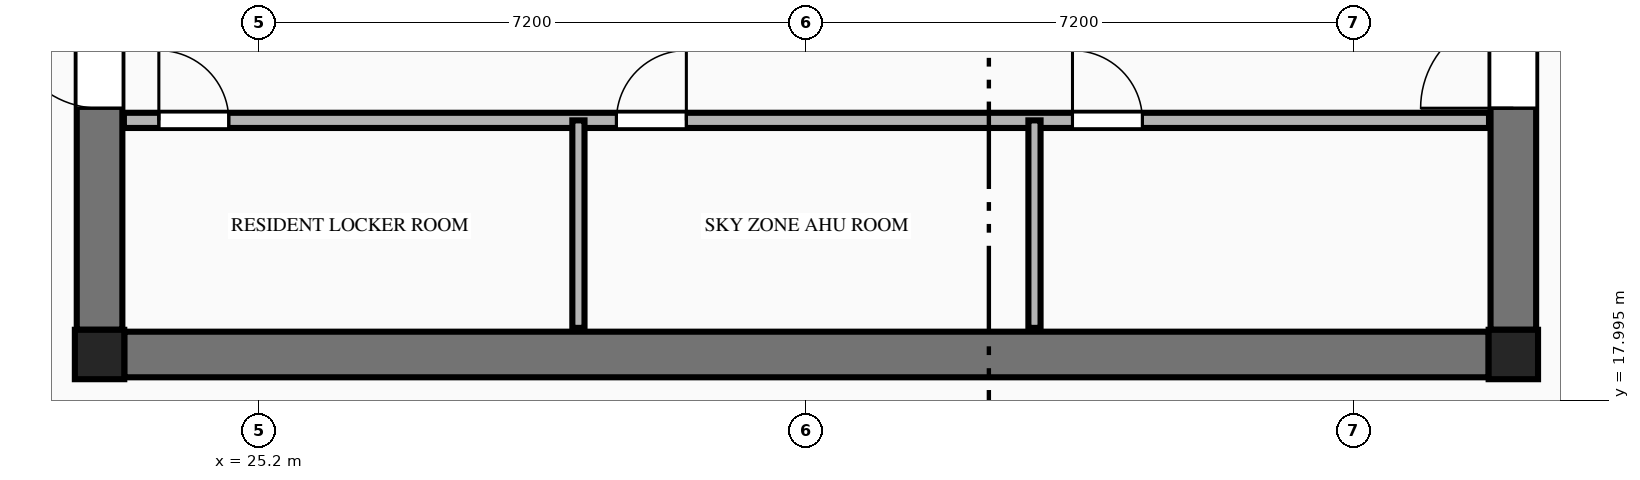
"""IFC4 building model, lengths in metres.
Left out: names, types, materials, properties, quantities, classifications, styles, units other than length and angle.
Written with IfcOpenShell. Run it as: python <this file> out.ifc"""

import sys

from ifc_helpers import new_model, si_unit, direction, frame, frame_2d, origin, origin_2d, place, context, subcontext, project, spatial, rectangle, extrude, element, fill, save


model = new_model("IFC4")
c1 = context("Model", 3, precision=1e-05, world=origin(), true_north=direction((0.0, 1.0)))
c2 = subcontext(c1, "Body", "Model", "MODEL_VIEW")
j1 = project(units=[si_unit("LENGTHUNIT", "METRE"), si_unit("PLANEANGLEUNIT", "RADIAN")], contexts=[c1])
p1 = place(None, origin())
s1 = spatial("IfcSite", under=j1, at=p1, CompositionType="ELEMENT")
p2 = place(p1, origin())
s2 = spatial("IfcBuilding", under=s1, at=p2, CompositionType="ELEMENT")
p3 = place(p2, frame((0.0, 0.0, 182.55)))
s3 = spatial("IfcBuildingStorey", under=s2, at=p3, CompositionType="ELEMENT", Elevation=182.55)
for number, where, z_axis, x_axis in (
    (1, (23.1, 18.6, 0.0), (0.0, 0.0, 1.0), (1.0, 0.0, 0.0)),
    (2, (41.7, 18.6, 0.0), (0.0, 0.0, 1.0), (1.0, 0.0, 0.0)),
):
    element("IfcColumn", number, at=place(p3, frame(where, z_axis=z_axis, x_axis=x_axis)), inside=s3, PredefinedType="COLUMN", context=c2, shape_type="SweptSolid", body=[
        extrude(rectangle(XDim=0.65, YDim=0.65, at=origin_2d()), origin(), (0.0, 0.0, 1.0), 3.55),
    ])
p4 = place(p3, frame((23.425, 18.6, 0.0), z_axis=(0.0, 0.0, 1.0), x_axis=(1.0, 0.0, 0.0)))
e3 = element("IfcWall", 3, at=p4, inside=s3, PredefinedType="SHEAR", context=c2, shape_type="SweptSolid", body=[
    extrude(rectangle(XDim=17.95, YDim=0.6, at=frame_2d((8.975, 0.0))), origin(), (0.0, 0.0, 1.0), 3.35),
])
p5 = place(p3, frame((23.1, 18.925, 0.0), z_axis=(0.0, 0.0, 1.0), x_axis=(0.0, 1.0, 0.0)))
e4 = element("IfcWall", 4, at=p5, inside=s3, PredefinedType="SHEAR", context=c2, shape_type="SweptSolid", body=[
    extrude(rectangle(XDim=13.95, YDim=0.6, at=frame_2d((6.975, 0.0))), origin(), (0.0, 0.0, 1.0), 3.35),
])
p6 = place(p5, frame((2.915, 0.0, 0.0)))
e5 = element("IfcOpeningElement", 5, at=p6, cuts=e4, PredefinedType="OPENING", context=c2, shape_type="SweptSolid", body=[
    extrude(rectangle(XDim=1.22, YDim=2.25, at=frame_2d((0.61, 1.125))), frame((0.0, 0.31, 0.0), z_axis=(0.0, -1.0, 0.0), x_axis=(1.0, 0.0, 0.0)), (0.0, 0.0, 1.0), 0.62),
])
p7 = place(p3, frame((41.7, 18.925, 0.0), z_axis=(0.0, 0.0, 1.0), x_axis=(0.0, 1.0, 0.0)))
e6 = element("IfcWall", 6, at=p7, inside=s3, PredefinedType="SHEAR", context=c2, shape_type="SweptSolid", body=[
    extrude(rectangle(XDim=13.95, YDim=0.6, at=frame_2d((6.975, 0.0))), origin(), (0.0, 0.0, 1.0), 3.35),
])
p8 = place(p7, frame((2.915, 0.0, 0.0)))
e7 = element("IfcOpeningElement", 7, at=p8, cuts=e6, PredefinedType="OPENING", context=c2, shape_type="SweptSolid", body=[
    extrude(rectangle(XDim=1.22, YDim=2.25, at=frame_2d((0.61, 1.125))), frame((0.0, 0.31, 0.0), z_axis=(0.0, -1.0, 0.0), x_axis=(1.0, 0.0, 0.0)), (0.0, 0.0, 1.0), 0.62),
])
p9 = place(p3, frame((23.42, 21.68, 0.0), z_axis=(0.0, 0.0, 1.0), x_axis=(1.0, 0.0, 0.0)))
e8 = element("IfcWall", 8, at=p9, inside=s3, PredefinedType="PLUMBINGWALL", context=c2, shape_type="SweptSolid", body=[
    extrude(rectangle(XDim=17.96, YDim=0.2, at=frame_2d((8.98, 0.0))), origin(), (0.0, 0.0, 1.0), 3.35),
])
p10 = place(p9, frame((0.46, 0.0, 0.0)))
e9 = element("IfcOpeningElement", 9, at=p10, cuts=e8, PredefinedType="OPENING", context=c2, shape_type="SweptSolid", body=[
    extrude(rectangle(XDim=0.92, YDim=2.15, at=frame_2d((0.46, 1.075))), frame((0.0, 0.11, 0.0), z_axis=(0.0, -1.0, 0.0), x_axis=(1.0, 0.0, 0.0)), (0.0, 0.0, 1.0), 0.22),
])
p11 = place(p9, frame((6.48, 0.0, 0.0)))
e10 = element("IfcOpeningElement", 10, at=p11, cuts=e8, PredefinedType="OPENING", context=c2, shape_type="SweptSolid", body=[
    extrude(rectangle(XDim=0.92, YDim=2.15, at=frame_2d((0.46, 1.075))), frame((0.0, 0.11, 0.0), z_axis=(0.0, -1.0, 0.0), x_axis=(1.0, 0.0, 0.0)), (0.0, 0.0, 1.0), 0.22),
])
p12 = place(p9, frame((12.48, 0.0, 0.0)))
e11 = element("IfcOpeningElement", 11, at=p12, cuts=e8, PredefinedType="OPENING", context=c2, shape_type="SweptSolid", body=[
    extrude(rectangle(XDim=0.92, YDim=2.15, at=frame_2d((0.46, 1.075))), frame((0.0, 0.11, 0.0), z_axis=(0.0, -1.0, 0.0), x_axis=(1.0, 0.0, 0.0)), (0.0, 0.0, 1.0), 0.22),
])
for number, where, z_axis, x_axis in (
    (12, (29.4, 18.95, 0.0), (0.0, 0.0, 1.0), (0.0, 1.0, 0.0)),
    (13, (35.4, 18.95, 0.0), (0.0, 0.0, 1.0), (0.0, 1.0, 0.0)),
):
    element("IfcWall", number, at=place(p3, frame(where, z_axis=z_axis, x_axis=x_axis)), inside=s3, PredefinedType="PARTITIONING", context=c2, shape_type="SweptSolid", body=[
        extrude(rectangle(XDim=2.73, YDim=0.16, at=frame_2d((1.365, 0.0))), origin(), (0.0, 0.0, 1.0), 3.35),
    ])
p13 = place(p6, origin())
e14 = element("IfcDoor", 14, at=p13, inside=s3, OperationType="SINGLE_SWING_RIGHT", PredefinedType="DOOR", context=c2, shape_type="SweptSolid", body=[
    extrude(rectangle(XDim=1.22, YDim=2.25, at=frame_2d((0.61, 1.125))), frame((0.0, 0.025, 0.0), z_axis=(0.0, -1.0, 0.0), x_axis=(1.0, 0.0, 0.0)), (0.0, 0.0, 1.0), 0.05),
])
fill(e5, e14)
p14 = place(p8, origin())
e15 = element("IfcDoor", 15, at=p14, inside=s3, OperationType="SINGLE_SWING_LEFT", PredefinedType="DOOR", context=c2, shape_type="SweptSolid", body=[
    extrude(rectangle(XDim=1.22, YDim=2.25, at=frame_2d((0.61, 1.125))), frame((0.0, 0.025, 0.0), z_axis=(0.0, -1.0, 0.0), x_axis=(1.0, 0.0, 0.0)), (0.0, 0.0, 1.0), 0.05),
])
fill(e7, e15)
p15 = place(p10, origin())
e16 = element("IfcDoor", 16, at=p15, inside=s3, OperationType="SINGLE_SWING_LEFT", PredefinedType="DOOR", context=c2, shape_type="SweptSolid", body=[
    extrude(rectangle(XDim=0.92, YDim=2.15, at=frame_2d((0.46, 1.075))), frame((0.0, 0.025, 0.0), z_axis=(0.0, -1.0, 0.0), x_axis=(1.0, 0.0, 0.0)), (0.0, 0.0, 1.0), 0.05),
])
fill(e9, e16)
p16 = place(p11, origin())
e17 = element("IfcDoor", 17, at=p16, inside=s3, OperationType="SINGLE_SWING_RIGHT", PredefinedType="DOOR", context=c2, shape_type="SweptSolid", body=[
    extrude(rectangle(XDim=0.92, YDim=2.15, at=frame_2d((0.46, 1.075))), frame((0.0, 0.025, 0.0), z_axis=(0.0, -1.0, 0.0), x_axis=(1.0, 0.0, 0.0)), (0.0, 0.0, 1.0), 0.05),
])
fill(e10, e17)
p17 = place(p12, origin())
e18 = element("IfcDoor", 18, at=p17, inside=s3, OperationType="SINGLE_SWING_LEFT", PredefinedType="DOOR", context=c2, shape_type="SweptSolid", body=[
    extrude(rectangle(XDim=0.92, YDim=2.15, at=frame_2d((0.46, 1.075))), frame((0.0, 0.025, 0.0), z_axis=(0.0, -1.0, 0.0), x_axis=(1.0, 0.0, 0.0)), (0.0, 0.0, 1.0), 0.05),
])
fill(e11, e18)
save(model, sys.argv[1])
